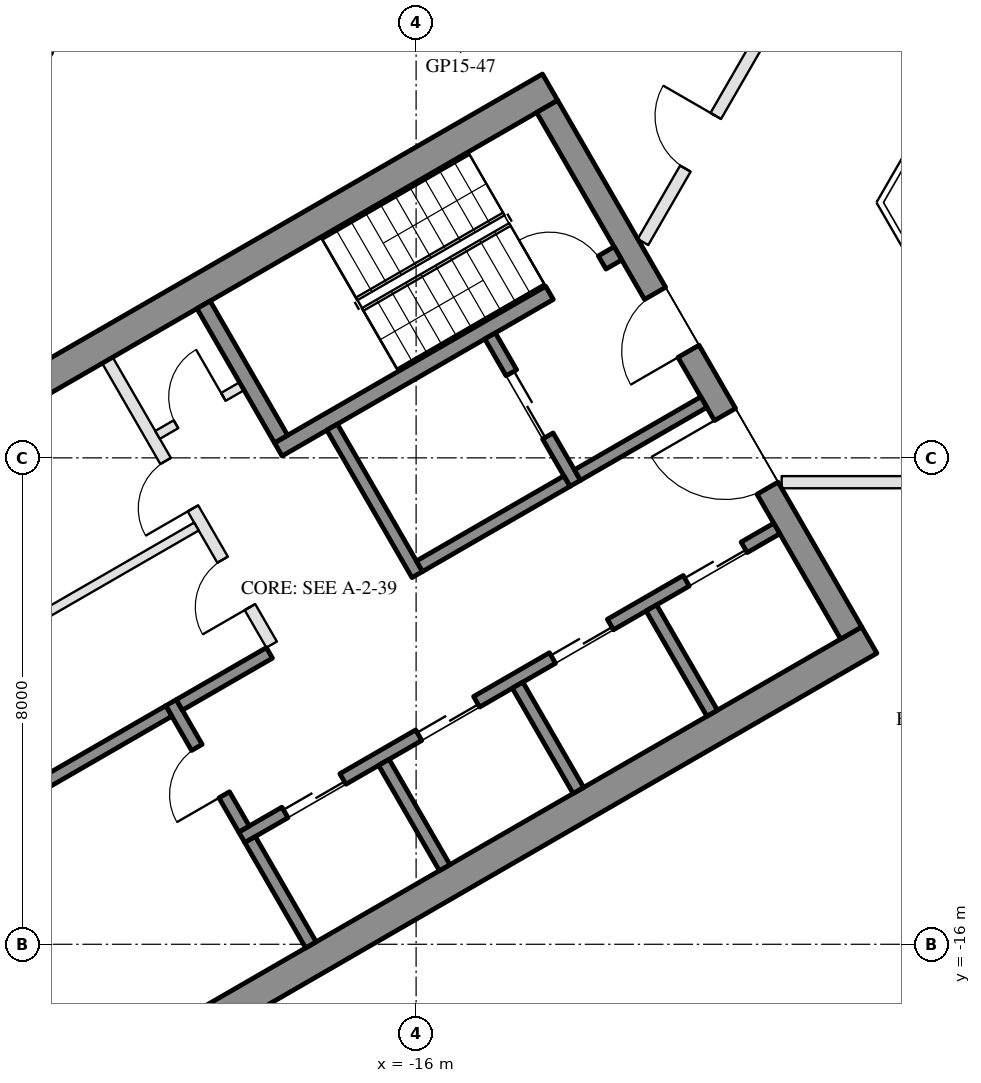
"""IFC4 building model, lengths in metres.
Left out: names, types, materials, properties, quantities, classifications, styles, units other than length and angle.
Written with IfcOpenShell. Run it as: python <this file> out.ifc"""

import sys

from ifc_helpers import new_model, si_unit, direction, frame, frame_2d, origin, place, context, subcontext, project, spatial, rectangle, extrude, element, fill, save


model = new_model("IFC4")
c1 = context("Model", 3, precision=1e-05, world=origin(), true_north=direction((0.0, 1.0)))
c2 = subcontext(c1, "Body", "Model", "MODEL_VIEW")
j1 = project(units=[si_unit("LENGTHUNIT", "METRE"), si_unit("PLANEANGLEUNIT", "RADIAN")], contexts=[c1])
p1 = place(None, origin())
s1 = spatial("IfcSite", under=j1, at=p1, CompositionType="ELEMENT")
p2 = place(p1, origin())
s2 = spatial("IfcBuilding", under=s1, at=p2, CompositionType="ELEMENT")
p3 = place(p2, frame((0.0, 0.0, 168.8)))
s3 = spatial("IfcBuildingStorey", under=s2, at=p3, CompositionType="ELEMENT", Elevation=168.8)
p4 = place(p3, frame((-20.309, 1.934, 0.0), z_axis=(0.0, 0.0, 1.0), x_axis=(-0.499992114976, -0.866029956157, 0.0)))
e1 = element("IfcWall", 1, at=p4, inside=s3, PredefinedType="SOLIDWALL", context=c2, shape_type="SweptSolid", body=[
    extrude(rectangle(XDim=6.74, YDim=0.35, at=frame_2d((3.37, 0.0))), origin(), (0.0, 0.0, 1.0), 3.55),
])
p5 = place(p4, frame((4.02, 0.0, 0.0)))
e2 = element("IfcOpeningElement", 2, at=p5, cuts=e1, PredefinedType="OPENING", context=c2, shape_type="SweptSolid", body=[
    extrude(rectangle(XDim=2.4, YDim=2.4, at=frame_2d((1.2, 1.2))), frame((0.0, 0.185, 0.0), z_axis=(0.0, -1.0, 0.0), x_axis=(1.0, 0.0, 0.0)), (0.0, 0.0, 1.0), 0.37),
])
p6 = place(p4, frame((0.77, 0.0, 0.3)))
e3 = element("IfcOpeningElement", 3, at=p6, cuts=e1, PredefinedType="OPENING", context=c2, shape_type="SweptSolid", body=[
    extrude(rectangle(XDim=2.9, YDim=2.65, at=frame_2d((1.45, 1.325))), frame((0.0, 0.185, 0.0), z_axis=(0.0, -1.0, 0.0), x_axis=(1.0, 0.0, 0.0)), (0.0, 0.0, 1.0), 0.37),
])
for number, where, z_axis, x_axis in (
    (4, (-13.797, -1.903, 0.0), (0.0, 0.0, 1.0), (-0.866, -0.5, 0.0)),
    (5, (-8.547, -10.997, 0.0), (0.0, 0.0, 1.0), (-0.866, -0.5, 0.0)),
):
    element("IfcWall", number, at=place(p3, frame(where, z_axis=z_axis, x_axis=x_axis)), inside=s3, PredefinedType="SHEAR", context=c2, shape_type="SweptSolid", body=[
        extrude(rectangle(XDim=14.837, YDim=0.5, at=frame_2d((7.418, 0.0))), origin(), (0.0, 0.0, 1.0), 3.5),
    ])
p7 = place(p3, frame((-13.845, -2.22, 0.0), z_axis=(0.0, 0.0, 1.0), x_axis=(0.500004234368, -0.866022959057, 0.0)))
e6 = element("IfcWall", 6, at=p7, inside=s3, PredefinedType="SHEAR", context=c2, shape_type="SweptSolid", body=[
    extrude(rectangle(XDim=10.0, YDim=0.4, at=frame_2d((5.0, 0.0))), origin(), (0.0, 0.0, 1.0), 3.5),
])
p8 = place(p7, frame((3.55, 0.0, 0.0)))
e7 = element("IfcOpeningElement", 7, at=p8, cuts=e6, PredefinedType="OPENING", context=c2, shape_type="SweptSolid", body=[
    extrude(rectangle(XDim=1.1, YDim=2.1, at=frame_2d((0.55, 1.05))), frame((0.0, 0.21, 0.0), z_axis=(0.0, -1.0, 0.0), x_axis=(1.0, 0.0, 0.0)), (0.0, 0.0, 1.0), 0.42),
])
p9 = place(p7, frame((5.85, 0.0, 0.0)))
e8 = element("IfcOpeningElement", 8, at=p9, cuts=e6, PredefinedType="OPENING", context=c2, shape_type="SweptSolid", body=[
    extrude(rectangle(XDim=1.4, YDim=2.1, at=frame_2d((0.7, 1.05))), frame((0.0, 0.21, 0.0), z_axis=(0.0, -1.0, 0.0), x_axis=(1.0, 0.0, 0.0)), (0.0, 0.0, 1.0), 0.42),
])
p10 = place(p3, frame((-12.681, -4.636, 0.0), z_axis=(0.0, 0.0, 1.0), x_axis=(-0.866021702275, -0.500006411147, 0.0)))
e9 = element("IfcWall", 9, at=p10, inside=s3, PredefinedType="SHEAR", context=c2, shape_type="SweptSolid", body=[
    extrude(rectangle(XDim=6.45, YDim=0.25, at=frame_2d((3.225, 0.0))), origin(), (0.0, 0.0, 1.0), 3.5),
])
p11 = place(p10, frame((0.3, 0.0, 0.0)))
e10 = element("IfcOpeningElement", 10, at=p11, cuts=e9, PredefinedType="OPENING", context=c2, shape_type="SweptSolid", body=[
    extrude(rectangle(XDim=1.0, YDim=2.1, at=frame_2d((0.5, 1.05))), frame((0.0, 0.135, 0.0), z_axis=(0.0, -1.0, 0.0), x_axis=(1.0, 0.0, 0.0)), (0.0, 0.0, 1.0), 0.27),
])
p12 = place(p3, frame((-19.496, -5.482, 0.0), z_axis=(0.0, 0.0, 1.0), x_axis=(0.499990435942, -0.866030925526, 0.0)))
e11 = element("IfcWall", 11, at=p12, inside=s3, PredefinedType="SHEAR", context=c2, shape_type="SweptSolid", body=[
    extrude(rectangle(XDim=2.55, YDim=0.25, at=frame_2d((1.275, 0.0))), origin(), (0.0, 0.0, 1.0), 3.5),
])
p13 = place(p3, frame((-17.381, -7.495, 0.0), z_axis=(0.0, 0.0, 1.0), x_axis=(0.500011755427, -0.866018616679, 0.0)))
e12 = element("IfcWall", 12, at=p13, inside=s3, PredefinedType="SHEAR", context=c2, shape_type="SweptSolid", body=[
    extrude(rectangle(XDim=2.8, YDim=0.2, at=frame_2d((1.4, 0.0))), origin(), (0.0, 0.0, 1.0), 3.5),
])
p14 = place(p3, frame((-14.783, -5.995, 0.0), z_axis=(0.0, 0.0, 1.0), x_axis=(0.49994636267, -0.866056369097, 0.0)))
e13 = element("IfcWall", 13, at=p14, inside=s3, PredefinedType="SHEAR", context=c2, shape_type="SweptSolid", body=[
    extrude(rectangle(XDim=2.8, YDim=0.2, at=frame_2d((1.4, 0.0))), origin(), (0.0, 0.0, 1.0), 3.5),
])
p15 = place(p14, frame((0.7, 0.0, 0.0)))
e14 = element("IfcOpeningElement", 14, at=p15, cuts=e13, PredefinedType="OPENING", context=c2, shape_type="SweptSolid", body=[
    extrude(rectangle(XDim=1.2, YDim=2.1, at=frame_2d((0.6, 1.05))), frame((0.0, 0.11, 0.0), z_axis=(0.0, -1.0, 0.0), x_axis=(1.0, 0.0, 0.0)), (0.0, 0.0, 1.0), 0.22),
])
p16 = place(p3, frame((-13.52, -8.383, 0.0), z_axis=(0.0, 0.0, 1.0), x_axis=(-0.866034573852, -0.49998411664, 0.0)))
e15 = element("IfcWall", 15, at=p16, inside=s3, PredefinedType="SHEAR", context=c2, shape_type="SweptSolid", body=[
    extrude(rectangle(XDim=2.8, YDim=0.2, at=frame_2d((1.4, 0.0))), origin(), (0.0, 0.0, 1.0), 3.5),
])
p17 = place(p3, frame((-11.268, -7.083, 0.0), z_axis=(0.0, 0.0, 1.0), x_axis=(-0.866050077142, -0.499957262057, 0.0)))
e16 = element("IfcWall", 16, at=p17, inside=s3, PredefinedType="SHEAR", context=c2, shape_type="SweptSolid", body=[
    extrude(rectangle(XDim=2.4, YDim=0.2, at=frame_2d((1.2, 0.0))), origin(), (0.0, 0.0, 1.0), 3.5),
])
p18 = place(p3, frame((-10.068, -9.162, 0.0), z_axis=(0.0, 0.0, 1.0), x_axis=(-0.866032725843, -0.499987317609, 0.0)))
e17 = element("IfcWall", 17, at=p18, inside=s3, PredefinedType="SHEAR", context=c2, shape_type="SweptSolid", body=[
    extrude(rectangle(XDim=10.16, YDim=0.2, at=frame_2d((5.08, 0.0))), origin(), (0.0, 0.0, 1.0), 3.5),
])
p19 = place(p18, frame((0.62, 0.0, 0.0)))
e18 = element("IfcOpeningElement", 18, at=p19, cuts=e17, PredefinedType="OPENING", context=c2, shape_type="SweptSolid", body=[
    extrude(rectangle(XDim=1.1, YDim=2.1, at=frame_2d((0.55, 1.05))), frame((0.0, 0.11, 0.0), z_axis=(0.0, -1.0, 0.0), x_axis=(1.0, 0.0, 0.0)), (0.0, 0.0, 1.0), 0.22),
])
p20 = place(p18, frame((3.16, 0.0, 0.0)))
e19 = element("IfcOpeningElement", 19, at=p20, cuts=e17, PredefinedType="OPENING", context=c2, shape_type="SweptSolid", body=[
    extrude(rectangle(XDim=1.1, YDim=2.1, at=frame_2d((0.55, 1.05))), frame((0.0, 0.11, 0.0), z_axis=(0.0, -1.0, 0.0), x_axis=(1.0, 0.0, 0.0)), (0.0, 0.0, 1.0), 0.22),
])
p21 = place(p18, frame((5.7, 0.0, 0.0)))
e20 = element("IfcOpeningElement", 20, at=p21, cuts=e17, PredefinedType="OPENING", context=c2, shape_type="SweptSolid", body=[
    extrude(rectangle(XDim=1.1, YDim=2.1, at=frame_2d((0.55, 1.05))), frame((0.0, 0.11, 0.0), z_axis=(0.0, -1.0, 0.0), x_axis=(1.0, 0.0, 0.0)), (0.0, 0.0, 1.0), 0.22),
])
p22 = place(p18, frame((8.24, 0.0, 0.0)))
e21 = element("IfcOpeningElement", 21, at=p22, cuts=e17, PredefinedType="OPENING", context=c2, shape_type="SweptSolid", body=[
    extrude(rectangle(XDim=1.1, YDim=2.1, at=frame_2d((0.55, 1.05))), frame((0.0, 0.11, 0.0), z_axis=(0.0, -1.0, 0.0), x_axis=(1.0, 0.0, 0.0)), (0.0, 0.0, 1.0), 0.22),
])
p23 = place(p3, frame((-20.031, -12.026, 0.0), z_axis=(0.0, 0.0, 1.0), x_axis=(0.500033551112, -0.866006032174, 0.0)))
e22 = element("IfcWall", 22, at=p23, inside=s3, PredefinedType="SHEAR", context=c2, shape_type="SweptSolid", body=[
    extrude(rectangle(XDim=2.4, YDim=0.2, at=frame_2d((1.2, 0.0))), origin(), (0.0, 0.0, 1.0), 3.5),
])
p24 = place(p23, frame((0.85, 0.0, 0.0)))
e23 = element("IfcOpeningElement", 23, at=p24, cuts=e22, PredefinedType="OPENING", context=c2, shape_type="SweptSolid", body=[
    extrude(rectangle(XDim=0.9, YDim=2.1, at=frame_2d((0.45, 1.05))), frame((0.0, 0.11, 0.0), z_axis=(0.0, -1.0, 0.0), x_axis=(1.0, 0.0, 0.0)), (0.0, 0.0, 1.0), 0.22),
])
p25 = place(p3, frame((-18.413, -11.208, 0.0), z_axis=(0.0, 0.0, 1.0), x_axis=(-0.866038183914, -0.499977863513, 0.0)))
e24 = element("IfcWall", 24, at=p25, inside=s3, PredefinedType="SHEAR", context=c2, shape_type="SweptSolid", body=[
    extrude(rectangle(XDim=1.71, YDim=0.2, at=frame_2d((0.855, 0.0))), origin(), (0.0, 0.0, 1.0), 3.5),
])
for number, where, z_axis, x_axis in (
    (25, (-12.131, -10.468, 0.0), (0.0, 0.0, 1.0), (0.5, -0.866, 0.0)),
    (26, (-14.331, -11.738, 0.0), (0.0, 0.0, 1.0), (0.5, -0.866, 0.0)),
    (27, (-16.531, -13.008, 0.0), (0.0, 0.0, 1.0), (0.5, -0.866, 0.0)),
    (28, (-18.73, -14.278, 0.0), (0.0, 0.0, 1.0), (0.5, -0.866, 0.0)),
):
    element("IfcWall", number, at=place(p3, frame(where, z_axis=z_axis, x_axis=x_axis)), inside=s3, PredefinedType="SHEAR", context=c2, shape_type="SweptSolid", body=[
        extrude(rectangle(XDim=2.0, YDim=0.2, at=frame_2d((1.0, 0.0))), origin(), (0.0, 0.0, 1.0), 3.5),
    ])
p26 = place(p3, frame((-20.067, -12.163, 0.0), z_axis=(0.0, 0.0, 1.0), x_axis=(-0.866055327414, -0.49994816717, 0.0)))
e29 = element("IfcWall", 29, at=p26, inside=s3, PredefinedType="SHEAR", context=c2, shape_type="SweptSolid", body=[
    extrude(rectangle(XDim=2.84, YDim=0.2, at=frame_2d((1.42, 0.0))), origin(), (0.0, 0.0, 1.0), 3.5),
])
p27 = place(p3, frame((-21.076, -6.395, 0.0), z_axis=(0.0, 0.0, 1.0), x_axis=(0.50001468107, -0.866016927499, 0.0)))
e30 = element("IfcWall", 30, at=p27, inside=s3, PredefinedType="PARTITIONING", context=c2, shape_type="SweptSolid", body=[
    extrude(rectangle(XDim=5.4, YDim=0.2, at=frame_2d((2.7, 0.0))), origin(), (0.0, 0.0, 1.0), 3.5),
])
p28 = place(p27, frame((1.913, 0.0, 0.0)))
e31 = element("IfcOpeningElement", 31, at=p28, cuts=e30, PredefinedType="OPENING", context=c2, shape_type="SweptSolid", body=[
    extrude(rectangle(XDim=0.9, YDim=2.1, at=frame_2d((0.45, 1.05))), frame((0.0, 0.11, 0.0), z_axis=(0.0, -1.0, 0.0), x_axis=(1.0, 0.0, 0.0)), (0.0, 0.0, 1.0), 0.22),
])
p29 = place(p27, frame((3.788, 0.0, 0.0)))
e32 = element("IfcOpeningElement", 32, at=p29, cuts=e30, PredefinedType="OPENING", context=c2, shape_type="SweptSolid", body=[
    extrude(rectangle(XDim=0.9, YDim=2.1, at=frame_2d((0.45, 1.05))), frame((0.0, 0.11, 0.0), z_axis=(0.0, -1.0, 0.0), x_axis=(1.0, 0.0, 0.0)), (0.0, 0.0, 1.0), 0.22),
])
p30 = place(p3, frame((-18.866, -6.822, 0.0), z_axis=(0.0, 0.0, 1.0), x_axis=(-0.866028054938, -0.499995408039, 0.0)))
e33 = element("IfcWall", 33, at=p30, inside=s3, PredefinedType="PARTITIONING", context=c2, shape_type="SweptSolid", body=[
    extrude(rectangle(XDim=1.6, YDim=0.15, at=frame_2d((0.8, 0.0))), origin(), (0.0, 0.0, 1.0), 3.5),
])
p31 = place(p30, frame((0.35, 0.0, 0.0)))
e34 = element("IfcOpeningElement", 34, at=p31, cuts=e33, PredefinedType="OPENING", context=c2, shape_type="SweptSolid", body=[
    extrude(rectangle(XDim=0.9, YDim=2.1, at=frame_2d((0.45, 1.05))), frame((0.0, 0.085, 0.0), z_axis=(0.0, -1.0, 0.0), x_axis=(1.0, 0.0, 0.0)), (0.0, 0.0, 1.0), 0.17),
])
p32 = place(p3, frame((-19.613, -9.13, 0.0), z_axis=(0.0, 0.0, 1.0), x_axis=(-0.866031734426, -0.499989034847, 0.0)))
e35 = element("IfcWall", 35, at=p32, inside=s3, PredefinedType="PARTITIONING", context=c2, shape_type="SweptSolid", body=[
    extrude(rectangle(XDim=6.95, YDim=0.15, at=frame_2d((3.475, 0.0))), origin(), (0.0, 0.0, 1.0), 3.5),
])
p33 = place(p3, frame((-3.697, -8.4, 0.0), z_axis=(0.0, 0.0, 1.0), x_axis=(-1.0, 0.0, 0.0)))
e36 = element("IfcWall", 36, at=p33, inside=s3, PredefinedType="PARTITIONING", context=c2, shape_type="SweptSolid", body=[
    extrude(rectangle(XDim=6.292, YDim=0.2, at=frame_2d((3.146, 0.0))), origin(), (0.0, 0.0, 1.0), 2.95),
])
p34 = place(p33, frame((2.646, 0.0, 0.0)))
e37 = element("IfcOpeningElement", 37, at=p34, cuts=e36, PredefinedType="OPENING", context=c2, shape_type="SweptSolid", body=[
    extrude(rectangle(XDim=1.0, YDim=2.1, at=frame_2d((0.5, 1.05))), frame((0.0, 0.11, 0.0), z_axis=(0.0, -1.0, 0.0), x_axis=(1.0, 0.0, 0.0)), (0.0, 0.0, 1.0), 0.22),
])
p35 = place(p3, frame((-12.269, -4.45, 0.0), z_axis=(0.0, 0.0, 1.0), x_axis=(0.500055316652, 0.865993464345, 0.0)))
e38 = element("IfcWall", 38, at=p35, inside=s3, PredefinedType="PARTITIONING", context=c2, shape_type="SweptSolid", body=[
    extrude(rectangle(XDim=3.788, YDim=0.2, at=frame_2d((1.894, 0.0))), origin(), (0.0, 0.0, 1.0), 2.95),
])
p36 = place(p35, frame((1.394, 0.0, 0.0)))
e39 = element("IfcOpeningElement", 39, at=p36, cuts=e38, PredefinedType="OPENING", context=c2, shape_type="SweptSolid", body=[
    extrude(rectangle(XDim=1.0, YDim=2.1, at=frame_2d((0.5, 1.05))), frame((0.0, 0.11, 0.0), z_axis=(0.0, -1.0, 0.0), x_axis=(1.0, 0.0, 0.0)), (0.0, 0.0, 1.0), 0.22),
])
p37 = place(p15, origin())
e40 = element("IfcDoor", 40, at=p37, inside=s3, OperationType="DOUBLE_DOOR_SLIDING", PredefinedType="DOOR", context=c2, shape_type="SweptSolid", body=[
    extrude(rectangle(XDim=1.2, YDim=2.1, at=frame_2d((0.6, 1.05))), frame((0.0, 0.025, 0.0), z_axis=(0.0, -1.0, 0.0), x_axis=(1.0, 0.0, 0.0)), (0.0, 0.0, 1.0), 0.05),
])
fill(e14, e40)
p38 = place(p31, frame((0.9, 0.0, 0.0), z_axis=(0.0, 0.0, 1.0), x_axis=(-1.0, 0.0, 0.0)))
e41 = element("IfcDoor", 41, at=p38, inside=s3, OperationType="SINGLE_SWING_RIGHT", PredefinedType="DOOR", context=c2, shape_type="SweptSolid", body=[
    extrude(rectangle(XDim=0.9, YDim=2.1, at=frame_2d((0.45, 1.05))), frame((0.0, 0.025, 0.0), z_axis=(0.0, -1.0, 0.0), x_axis=(1.0, 0.0, 0.0)), (0.0, 0.0, 1.0), 0.05),
])
fill(e34, e41)
p39 = place(p19, origin())
e42 = element("IfcDoor", 42, at=p39, inside=s3, OperationType="DOUBLE_DOOR_SLIDING", PredefinedType="DOOR", context=c2, shape_type="SweptSolid", body=[
    extrude(rectangle(XDim=1.1, YDim=2.1, at=frame_2d((0.55, 1.05))), frame((0.0, 0.025, 0.0), z_axis=(0.0, -1.0, 0.0), x_axis=(1.0, 0.0, 0.0)), (0.0, 0.0, 1.0), 0.05),
])
fill(e18, e42)
p40 = place(p20, origin())
e43 = element("IfcDoor", 43, at=p40, inside=s3, OperationType="DOUBLE_DOOR_SLIDING", PredefinedType="DOOR", context=c2, shape_type="SweptSolid", body=[
    extrude(rectangle(XDim=1.1, YDim=2.1, at=frame_2d((0.55, 1.05))), frame((0.0, 0.025, 0.0), z_axis=(0.0, -1.0, 0.0), x_axis=(1.0, 0.0, 0.0)), (0.0, 0.0, 1.0), 0.05),
])
fill(e19, e43)
p41 = place(p21, origin())
e44 = element("IfcDoor", 44, at=p41, inside=s3, OperationType="DOUBLE_DOOR_SLIDING", PredefinedType="DOOR", context=c2, shape_type="SweptSolid", body=[
    extrude(rectangle(XDim=1.1, YDim=2.1, at=frame_2d((0.55, 1.05))), frame((0.0, 0.025, 0.0), z_axis=(0.0, -1.0, 0.0), x_axis=(1.0, 0.0, 0.0)), (0.0, 0.0, 1.0), 0.05),
])
fill(e20, e44)
p42 = place(p22, origin())
e45 = element("IfcDoor", 45, at=p42, inside=s3, OperationType="DOUBLE_DOOR_SLIDING", PredefinedType="DOOR", context=c2, shape_type="SweptSolid", body=[
    extrude(rectangle(XDim=1.1, YDim=2.1, at=frame_2d((0.55, 1.05))), frame((0.0, 0.025, 0.0), z_axis=(0.0, -1.0, 0.0), x_axis=(1.0, 0.0, 0.0)), (0.0, 0.0, 1.0), 0.05),
])
fill(e21, e45)
p43 = place(p24, frame((0.9, 0.0, 0.0), z_axis=(0.0, 0.0, 1.0), x_axis=(-1.0, 0.0, 0.0)))
e46 = element("IfcDoor", 46, at=p43, inside=s3, OperationType="SINGLE_SWING_LEFT", PredefinedType="DOOR", context=c2, shape_type="SweptSolid", body=[
    extrude(rectangle(XDim=0.9, YDim=2.1, at=frame_2d((0.45, 1.05))), frame((0.0, 0.025, 0.0), z_axis=(0.0, -1.0, 0.0), x_axis=(1.0, 0.0, 0.0)), (0.0, 0.0, 1.0), 0.05),
])
fill(e23, e46)
p44 = place(p28, frame((0.9, 0.0, 0.0), z_axis=(0.0, 0.0, 1.0), x_axis=(-1.0, 0.0, 0.0)))
e47 = element("IfcDoor", 47, at=p44, inside=s3, OperationType="SINGLE_SWING_LEFT", PredefinedType="DOOR", context=c2, shape_type="SweptSolid", body=[
    extrude(rectangle(XDim=0.9, YDim=2.1, at=frame_2d((0.45, 1.05))), frame((0.0, 0.025, 0.0), z_axis=(0.0, -1.0, 0.0), x_axis=(1.0, 0.0, 0.0)), (0.0, 0.0, 1.0), 0.05),
])
fill(e31, e47)
p45 = place(p29, frame((0.9, 0.0, 0.0), z_axis=(0.0, 0.0, 1.0), x_axis=(-1.0, 0.0, 0.0)))
e48 = element("IfcDoor", 48, at=p45, inside=s3, OperationType="SINGLE_SWING_LEFT", PredefinedType="DOOR", context=c2, shape_type="SweptSolid", body=[
    extrude(rectangle(XDim=0.9, YDim=2.1, at=frame_2d((0.45, 1.05))), frame((0.0, 0.025, 0.0), z_axis=(0.0, -1.0, 0.0), x_axis=(1.0, 0.0, 0.0)), (0.0, 0.0, 1.0), 0.05),
])
fill(e32, e48)
p46 = place(p8, frame((1.1, 0.0, 0.0), z_axis=(0.0, 0.0, 1.0), x_axis=(-1.0, 0.0, 0.0)))
e49 = element("IfcDoor", 49, at=p46, inside=s3, OperationType="SINGLE_SWING_LEFT", PredefinedType="DOOR", context=c2, shape_type="SweptSolid", body=[
    extrude(rectangle(XDim=1.1, YDim=2.1, at=frame_2d((0.55, 1.05))), frame((0.0, 0.025, 0.0), z_axis=(0.0, -1.0, 0.0), x_axis=(1.0, 0.0, 0.0)), (0.0, 0.0, 1.0), 0.05),
])
fill(e7, e49)
p47 = place(p9, frame((1.4, 0.0, 0.0), z_axis=(0.0, 0.0, 1.0), x_axis=(-1.0, 0.0, 0.0)))
e50 = element("IfcDoor", 50, at=p47, inside=s3, OperationType="DOUBLE_DOOR_SINGLE_SWING", PredefinedType="DOOR", context=c2, shape_type="SweptSolid", body=[
    extrude(rectangle(XDim=1.4, YDim=2.1, at=frame_2d((0.7, 1.05))), frame((0.0, 0.025, 0.0), z_axis=(0.0, -1.0, 0.0), x_axis=(1.0, 0.0, 0.0)), (0.0, 0.0, 1.0), 0.05),
])
fill(e8, e50)
p48 = place(p11, frame((1.0, 0.0, 0.0), z_axis=(0.0, 0.0, 1.0), x_axis=(-1.0, 0.0, 0.0)))
e51 = element("IfcDoor", 51, at=p48, inside=s3, OperationType="SINGLE_SWING_LEFT", PredefinedType="DOOR", context=c2, shape_type="SweptSolid", body=[
    extrude(rectangle(XDim=1.0, YDim=2.1, at=frame_2d((0.5, 1.05))), frame((0.0, 0.025, 0.0), z_axis=(0.0, -1.0, 0.0), x_axis=(1.0, 0.0, 0.0)), (0.0, 0.0, 1.0), 0.05),
])
fill(e10, e51)
p49 = place(p36, origin())
e52 = element("IfcDoor", 52, at=p49, inside=s3, OperationType="SINGLE_SWING_RIGHT", PredefinedType="DOOR", context=c2, shape_type="SweptSolid", body=[
    extrude(rectangle(XDim=1.0, YDim=2.1, at=frame_2d((0.5, 1.05))), frame((0.0, 0.025, 0.0), z_axis=(0.0, -1.0, 0.0), x_axis=(1.0, 0.0, 0.0)), (0.0, 0.0, 1.0), 0.05),
])
fill(e39, e52)
save(model, sys.argv[1])
